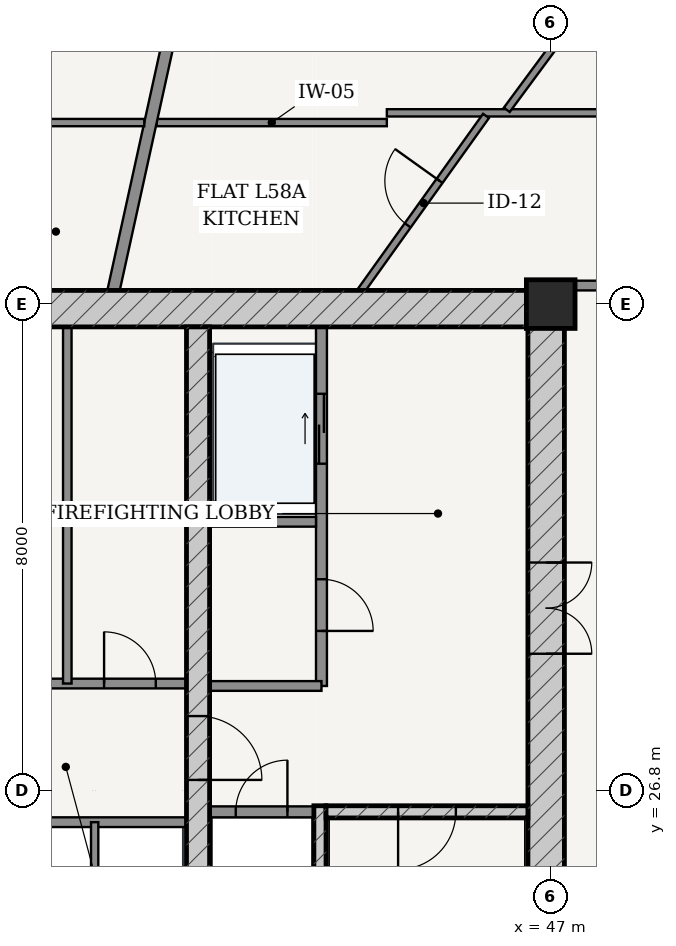
"""IFC4 building model, lengths in metres.
Left out: names, types, materials, properties, quantities, classifications, styles, units other than length and angle.
Written with IfcOpenShell. Run it as: python <this file> out.ifc"""

import sys

from ifc_helpers import new_model, si_unit, direction, frame, frame_2d, origin, origin_2d, place, context, subcontext, project, spatial, rectangle, extrude, source, transform, mapped, element, fill, save


model = new_model("IFC4")
c1 = context("Model", 3, precision=1e-05, world=origin(), true_north=direction((-0.2419218956, 0.970295726276)))
c2 = subcontext(c1, "Body", "Model", "MODEL_VIEW")
j1 = project(units=[si_unit("LENGTHUNIT", "METRE"), si_unit("PLANEANGLEUNIT", "RADIAN")], contexts=[c1])
p1 = place(None, origin())
s1 = spatial("IfcSite", under=j1, at=p1, CompositionType="ELEMENT")
p2 = place(p1, origin())
s2 = spatial("IfcBuilding", under=s1, at=p2, CompositionType="ELEMENT")
p3 = place(p2, frame((0.0, 0.0, 220.8)))
s3 = spatial("IfcBuildingStorey", under=s2, at=p3, CompositionType="ELEMENT", Elevation=220.8)
p4 = place(p3, frame((47.0, 34.8, 0.0), z_axis=(0.0, 0.0, 1.0), x_axis=(1.0, 0.0, 0.0)))
e1 = element("IfcColumn", 1, at=p4, inside=s3, PredefinedType="COLUMN", context=c2, shape_type="SweptSolid", body=[
    extrude(rectangle(XDim=0.8, YDim=0.8, at=origin_2d()), origin(), (0.0, 0.0, 1.0), 3.7),
])
p5 = place(p3, frame((28.775, 34.725, 0.0), z_axis=(0.0, 0.0, 1.0), x_axis=(1.0, 0.0, 0.0)))
e2 = element("IfcWall", 2, at=p5, inside=s3, PredefinedType="SHEAR", context=c2, shape_type="SweptSolid", body=[
    extrude(rectangle(XDim=18.45, YDim=0.6, at=frame_2d((9.225, 0.0))), origin(), (0.0, 0.0, 1.0), 3.435),
])
p6 = place(p3, frame((46.925, 19.175, 0.0), z_axis=(0.0, 0.0, 1.0), x_axis=(0.0, 1.0, 0.0)))
e3 = element("IfcWall", 3, at=p6, inside=s3, PredefinedType="SHEAR", context=c2, shape_type="SweptSolid", body=[
    extrude(rectangle(XDim=15.25, YDim=0.6, at=frame_2d((7.625, 0.0))), origin(), (0.0, 0.0, 1.0), 3.435),
])
p7 = place(p6, frame((9.875, 0.0, 0.0)))
e4 = element("IfcOpeningElement", 4, at=p7, cuts=e3, PredefinedType="OPENING", context=c2, shape_type="SweptSolid", body=[
    extrude(rectangle(XDim=1.5, YDim=2.2, at=frame_2d((0.75, 1.1))), frame((0.0, 0.31, 0.0), z_axis=(0.0, -1.0, 0.0), x_axis=(1.0, 0.0, 0.0)), (0.0, 0.0, 1.0), 0.62),
])
p8 = place(p3, frame((43.205, 19.175, 0.0), z_axis=(0.0, 0.0, 1.0), x_axis=(0.0, 1.0, 0.0)))
e5 = element("IfcWall", 5, at=p8, inside=s3, PredefinedType="SOLIDWALL", context=c2, shape_type="SweptSolid", body=[
    extrude(rectangle(XDim=7.375, YDim=0.2, at=frame_2d((3.688, 0.0))), origin(), (0.0, 0.0, 1.0), 3.435),
])
p9 = place(p3, frame((43.305, 26.45, 0.0), z_axis=(0.0, 0.0, 1.0), x_axis=(1.0, 0.0, 0.0)))
e6 = element("IfcWall", 6, at=p9, inside=s3, PredefinedType="SOLIDWALL", context=c2, shape_type="SweptSolid", body=[
    extrude(rectangle(XDim=3.32, YDim=0.2, at=frame_2d((1.66, 0.0))), origin(), (0.0, 0.0, 1.0), 3.435),
])
p10 = place(p9, frame((1.185, 0.0, 0.0)))
e7 = element("IfcOpeningElement", 7, at=p10, cuts=e6, PredefinedType="OPENING", context=c2, shape_type="SweptSolid", body=[
    extrude(rectangle(XDim=0.95, YDim=2.15, at=frame_2d((0.475, 1.075))), frame((0.0, 0.11, 0.0), z_axis=(0.0, -1.0, 0.0), x_axis=(1.0, 0.0, 0.0)), (0.0, 0.0, 1.0), 0.22),
])
p11 = place(p3, frame((41.2, 19.175, 0.0), z_axis=(0.0, 0.0, 1.0), x_axis=(0.0, 1.0, 0.0)))
e8 = element("IfcWall", 8, at=p11, inside=s3, PredefinedType="SHEAR", context=c2, shape_type="SweptSolid", body=[
    extrude(rectangle(XDim=15.25, YDim=0.38, at=frame_2d((7.625, 0.0))), origin(), (0.0, 0.0, 1.0), 3.435),
])
p12 = place(p11, frame((7.8, 0.0, 0.0)))
e9 = element("IfcOpeningElement", 9, at=p12, cuts=e8, PredefinedType="OPENING", context=c2, shape_type="SweptSolid", body=[
    extrude(rectangle(XDim=1.05, YDim=2.15, at=frame_2d((0.525, 1.075))), frame((0.0, 0.2, 0.0), z_axis=(0.0, -1.0, 0.0), x_axis=(1.0, 0.0, 0.0)), (0.0, 0.0, 1.0), 0.4),
])
p13 = place(p3, frame((41.39, 26.45, 0.0), z_axis=(0.0, 0.0, 1.0), x_axis=(1.0, 0.0, 0.0)))
e10 = element("IfcWall", 10, at=p13, inside=s3, PredefinedType="PARTITIONING", context=c2, shape_type="SweptSolid", body=[
    extrude(rectangle(XDim=1.71, YDim=0.18, at=frame_2d((0.855, 0.0))), origin(), (0.0, 0.0, 1.0), 3.435),
])
p14 = place(p13, frame((0.43, 0.0, 0.0)))
e11 = element("IfcOpeningElement", 11, at=p14, cuts=e10, PredefinedType="OPENING", context=c2, shape_type="SweptSolid", body=[
    extrude(rectangle(XDim=0.85, YDim=2.1, at=frame_2d((0.425, 1.05))), frame((0.0, 0.1, 0.0), z_axis=(0.0, -1.0, 0.0), x_axis=(1.0, 0.0, 0.0)), (0.0, 0.0, 1.0), 0.2),
])
p15 = place(p3, frame((43.23, 28.52, 0.0), z_axis=(0.0, 0.0, 1.0), x_axis=(0.0, 1.0, 0.0)))
e12 = element("IfcWall", 12, at=p15, inside=s3, PredefinedType="PARTITIONING", context=c2, shape_type="SweptSolid", body=[
    extrude(rectangle(XDim=5.905, YDim=0.18, at=frame_2d((2.953, 0.0))), origin(), (0.0, 0.0, 1.0), 3.435),
])
p16 = place(p15, frame((0.905, 0.0, 0.0)))
e13 = element("IfcOpeningElement", 13, at=p16, cuts=e12, PredefinedType="OPENING", context=c2, shape_type="SweptSolid", body=[
    extrude(rectangle(XDim=0.85, YDim=2.1, at=frame_2d((0.425, 1.05))), frame((0.0, 0.1, 0.0), z_axis=(0.0, -1.0, 0.0), x_axis=(1.0, 0.0, 0.0)), (0.0, 0.0, 1.0), 0.2),
])
p17 = place(p15, frame((3.655, 0.0, 0.0)))
e14 = element("IfcOpeningElement", 14, at=p17, cuts=e12, PredefinedType="OPENING", context=c2, shape_type="SweptSolid", body=[
    extrude(rectangle(XDim=1.15, YDim=2.2, at=frame_2d((0.575, 1.1))), frame((0.0, 0.1, 0.0), z_axis=(0.0, -1.0, 0.0), x_axis=(1.0, 0.0, 0.0)), (0.0, 0.0, 1.0), 0.2),
])
p18 = place(p3, frame((41.39, 31.22, 0.0), z_axis=(0.0, 0.0, 1.0), x_axis=(1.0, 0.0, 0.0)))
e15 = element("IfcWall", 15, at=p18, inside=s3, PredefinedType="PARTITIONING", context=c2, shape_type="SweptSolid", body=[
    extrude(rectangle(XDim=1.75, YDim=0.16, at=frame_2d((0.875, 0.0))), origin(), (0.0, 0.0, 1.0), 3.435),
])
p19 = place(p3, frame((41.39, 28.52, 0.0), z_axis=(0.0, 0.0, 1.0), x_axis=(1.0, 0.0, 0.0)))
e16 = element("IfcWall", 16, at=p19, inside=s3, PredefinedType="PARTITIONING", context=c2, shape_type="SweptSolid", body=[
    extrude(rectangle(XDim=1.84, YDim=0.16, at=frame_2d((0.92, 0.0))), origin(), (0.0, 0.0, 1.0), 3.435),
])
p20 = place(p3, frame((34.99, 28.56, 0.0), z_axis=(0.0, 0.0, 1.0), x_axis=(1.0, 0.0, 0.0)))
e17 = element("IfcWall", 17, at=p20, inside=s3, PredefinedType="PARTITIONING", context=c2, shape_type="SweptSolid", body=[
    extrude(rectangle(XDim=6.02, YDim=0.16, at=frame_2d((3.01, 0.0))), origin(), (0.0, 0.0, 1.0), 3.435),
])
p21 = place(p20, frame((0.505, 0.0, 0.0)))
e18 = element("IfcOpeningElement", 18, at=p21, cuts=e17, PredefinedType="OPENING", context=c2, shape_type="SweptSolid", body=[
    extrude(rectangle(XDim=0.85, YDim=2.1, at=frame_2d((0.425, 1.05))), frame((0.0, 0.09, 0.0), z_axis=(0.0, -1.0, 0.0), x_axis=(1.0, 0.0, 0.0)), (0.0, 0.0, 1.0), 0.18),
])
p22 = place(p20, frame((2.58, 0.0, 0.0)))
e19 = element("IfcOpeningElement", 19, at=p22, cuts=e17, PredefinedType="OPENING", context=c2, shape_type="SweptSolid", body=[
    extrude(rectangle(XDim=0.86, YDim=2.1, at=frame_2d((0.43, 1.05))), frame((0.0, 0.09, 0.0), z_axis=(0.0, -1.0, 0.0), x_axis=(1.0, 0.0, 0.0)), (0.0, 0.0, 1.0), 0.18),
])
p23 = place(p20, frame((4.665, 0.0, 0.0)))
e20 = element("IfcOpeningElement", 20, at=p23, cuts=e17, PredefinedType="OPENING", context=c2, shape_type="SweptSolid", body=[
    extrude(rectangle(XDim=0.85, YDim=2.1, at=frame_2d((0.425, 1.05))), frame((0.0, 0.09, 0.0), z_axis=(0.0, -1.0, 0.0), x_axis=(1.0, 0.0, 0.0)), (0.0, 0.0, 1.0), 0.18),
])
p24 = place(p3, frame((39.05, 28.56, 0.0), z_axis=(0.0, 0.0, 1.0), x_axis=(0.0, 1.0, 0.0)))
e21 = element("IfcWall", 21, at=p24, inside=s3, PredefinedType="PARTITIONING", context=c2, shape_type="SweptSolid", body=[
    extrude(rectangle(XDim=5.865, YDim=0.14, at=frame_2d((2.933, 0.0))), origin(), (0.0, 0.0, 1.0), 3.435),
])
p25 = place(p3, frame((34.99, 26.28, 0.0), z_axis=(0.0, 0.0, 1.0), x_axis=(1.0, 0.0, 0.0)))
e22 = element("IfcWall", 22, at=p25, inside=s3, PredefinedType="PARTITIONING", context=c2, shape_type="SweptSolid", body=[
    extrude(rectangle(XDim=6.02, YDim=0.16, at=frame_2d((3.01, 0.0))), origin(), (0.0, 0.0, 1.0), 3.435),
])
p26 = place(p25, frame((0.225, 0.0, 0.0)))
e23 = element("IfcOpeningElement", 23, at=p26, cuts=e22, PredefinedType="OPENING", context=c2, shape_type="SweptSolid", body=[
    extrude(rectangle(XDim=1.1, YDim=2.2, at=frame_2d((0.55, 1.1))), frame((0.0, 0.09, 0.0), z_axis=(0.0, -1.0, 0.0), x_axis=(1.0, 0.0, 0.0)), (0.0, 0.0, 1.0), 0.18),
])
p27 = place(p25, frame((1.705, 0.0, 0.0)))
e24 = element("IfcOpeningElement", 24, at=p27, cuts=e22, PredefinedType="OPENING", context=c2, shape_type="SweptSolid", body=[
    extrude(rectangle(XDim=1.1, YDim=2.2, at=frame_2d((0.55, 1.1))), frame((0.0, 0.09, 0.0), z_axis=(0.0, -1.0, 0.0), x_axis=(1.0, 0.0, 0.0)), (0.0, 0.0, 1.0), 0.18),
])
p28 = place(p3, frame((39.5, 23.72, 0.0), z_axis=(0.0, 0.0, 1.0), x_axis=(0.0, 1.0, 0.0)))
e25 = element("IfcWall", 25, at=p28, inside=s3, PredefinedType="PARTITIONING", context=c2, shape_type="SweptSolid", body=[
    extrude(rectangle(XDim=2.56, YDim=0.12, at=frame_2d((1.28, 0.0))), origin(), (0.0, 0.0, 1.0), 3.435),
])
p29 = place(p3, frame((47.225, 35.105, 0.0), z_axis=(0.0, 0.0, 1.0), x_axis=(1.0, 0.0, 0.0)))
e26 = element("IfcWall", 26, at=p29, inside=s3, PredefinedType="PARTITIONING", context=c2, shape_type="SweptSolid", body=[
    extrude(rectangle(XDim=1.93, YDim=0.16, at=frame_2d((0.965, 0.0))), origin(), (0.0, 0.0, 1.0), 3.435),
])
p30 = place(p3, frame((40.52, 37.785, 0.0), z_axis=(0.0, 0.0, 1.0), x_axis=(1.0, 0.0, 0.0)))
e27 = element("IfcWall", 27, at=p30, inside=s3, PredefinedType="PARTITIONING", context=c2, shape_type="SweptSolid", body=[
    extrude(rectangle(XDim=3.785, YDim=0.12, at=frame_2d((1.893, 0.0))), origin(), (0.0, 0.0, 1.0), 2.951),
])
p31 = place(p3, frame((44.305, 37.945, 0.0), z_axis=(0.0, 0.0, 1.0), x_axis=(1.0, 0.0, 0.0)))
e28 = element("IfcWall", 28, at=p31, inside=s3, PredefinedType="PARTITIONING", context=c2, shape_type="SweptSolid", body=[
    extrude(rectangle(XDim=7.69, YDim=0.12, at=frame_2d((3.845, 0.0))), origin(), (0.0, 0.0, 1.0), 2.951),
])
p32 = place(p31, frame((3.591, 0.0, 0.0)))
e29 = element("IfcOpeningElement", 29, at=p32, cuts=e28, PredefinedType="OPENING", context=c2, shape_type="SweptSolid", body=[
    extrude(rectangle(XDim=0.9, YDim=2.15, at=frame_2d((0.45, 1.075))), frame((0.0, 0.07, 0.0), z_axis=(0.0, -1.0, 0.0), x_axis=(1.0, 0.0, 0.0)), (0.0, 0.0, 1.0), 0.14),
])
p33 = place(p3, frame((46.278, 37.995, 0.0), z_axis=(0.0, 0.0, 1.0), x_axis=(0.594518724985, 0.80408176552, 0.0)))
e30 = element("IfcWall", 30, at=p33, inside=s3, PredefinedType="PARTITIONING", context=c2, shape_type="SweptSolid", body=[
    extrude(rectangle(XDim=6.344, YDim=0.12, at=frame_2d((3.172, 0.0))), origin(), (0.0, 0.0, 1.0), 2.951),
])
p34 = place(p33, frame((1.715, 0.0, 0.0)))
e31 = element("IfcOpeningElement", 31, at=p34, cuts=e30, PredefinedType="OPENING", context=c2, shape_type="SweptSolid", body=[
    extrude(rectangle(XDim=0.9, YDim=2.15, at=frame_2d((0.45, 1.075))), frame((0.0, 0.07, 0.0), z_axis=(0.0, -1.0, 0.0), x_axis=(1.0, 0.0, 0.0)), (0.0, 0.0, 1.0), 0.14),
])
p35 = place(p3, frame((43.885, 35.027, 0.0), z_axis=(0.0, 0.0, 1.0), x_axis=(0.581801309538, 0.813330951225, 0.0)))
e32 = element("IfcWall", 32, at=p35, inside=s3, PredefinedType="PARTITIONING", context=c2, shape_type="SweptSolid", body=[
    extrude(rectangle(XDim=3.526, YDim=0.12, at=frame_2d((1.763, 0.0))), origin(), (0.0, 0.0, 1.0), 3.435),
])
p36 = place(p35, frame((1.313, 0.0, 0.0)))
e33 = element("IfcOpeningElement", 33, at=p36, cuts=e32, PredefinedType="OPENING", context=c2, shape_type="SweptSolid", body=[
    extrude(rectangle(XDim=0.9, YDim=2.15, at=frame_2d((0.45, 1.075))), frame((0.0, 0.07, 0.0), z_axis=(0.0, -1.0, 0.0), x_axis=(1.0, 0.0, 0.0)), (0.0, 0.0, 1.0), 0.14),
])
p37 = place(p3, frame((39.811, 35.027, 0.0), z_axis=(0.0, 0.0, 1.0), x_axis=(0.214966857327, 0.976621344356, 0.0)))
e34 = element("IfcWall", 34, at=p37, inside=s3, PredefinedType="PARTITIONING", context=c2, shape_type="SweptSolid", body=[
    extrude(rectangle(XDim=11.258, YDim=0.2, at=frame_2d((5.629, 0.0))), origin(), (0.0, 0.0, 1.0), 2.52),
])
p38 = place(p3, frame((31.695, 37.785, 0.0), z_axis=(0.0, 0.0, 1.0), x_axis=(1.0, 0.0, 0.0)))
e35 = element("IfcWall", 35, at=p38, inside=s3, PredefinedType="PARTITIONING", context=c2, shape_type="SweptSolid", body=[
    extrude(rectangle(XDim=8.621, YDim=0.12, at=frame_2d((4.311, 0.0))), origin(), (0.0, 0.0, 1.0), 2.951),
])
p39 = place(p38, frame((1.716, 0.0, 0.0)))
e36 = element("IfcOpeningElement", 36, at=p39, cuts=e35, PredefinedType="OPENING", context=c2, shape_type="SweptSolid", body=[
    extrude(rectangle(XDim=0.9, YDim=2.15, at=frame_2d((0.45, 1.075))), frame((0.0, 0.07, 0.0), z_axis=(0.0, -1.0, 0.0), x_axis=(1.0, 0.0, 0.0)), (0.0, 0.0, 1.0), 0.14),
])
p40 = place(p38, frame((5.784, 0.0, 0.0)))
e37 = element("IfcOpeningElement", 37, at=p40, cuts=e35, PredefinedType="OPENING", context=c2, shape_type="SweptSolid", body=[
    extrude(rectangle(XDim=0.9, YDim=2.15, at=frame_2d((0.45, 1.075))), frame((0.0, 0.07, 0.0), z_axis=(0.0, -1.0, 0.0), x_axis=(1.0, 0.0, 0.0)), (0.0, 0.0, 1.0), 0.14),
])
m1 = source(origin(), c2, "Body", "SweptSolid", [
    extrude(rectangle(XDim=1.5, YDim=2.2, at=frame_2d((0.75, 1.1))), frame((0.0, 0.025, 0.0), z_axis=(0.0, -1.0, 0.0), x_axis=(1.0, 0.0, 0.0)), (0.0, 0.0, 1.0), 0.05),
])
p41 = place(p7, frame((1.5, 0.0, 0.0), z_axis=(0.0, 0.0, 1.0), x_axis=(-1.0, 0.0, 0.0)))
e38 = element("IfcDoor", 38, at=p41, inside=s3, OperationType="DOUBLE_DOOR_SINGLE_SWING", PredefinedType="DOOR", context=c2, shape_type="MappedRepresentation", body=[
    mapped(m1, transform((0.0, 0.0, 0.0), scale=1.0)),
])
fill(e4, e38)
m2 = source(origin(), c2, "Body", "SweptSolid", [
    extrude(rectangle(XDim=1.05, YDim=2.15, at=frame_2d((0.525, 1.075))), frame((0.0, 0.025, 0.0), z_axis=(0.0, -1.0, 0.0), x_axis=(1.0, 0.0, 0.0)), (0.0, 0.0, 1.0), 0.05),
])
p42 = place(p12, frame((1.05, 0.0, 0.0), z_axis=(0.0, 0.0, 1.0), x_axis=(-1.0, 0.0, 0.0)))
e39 = element("IfcDoor", 39, at=p42, inside=s3, OperationType="SINGLE_SWING_RIGHT", PredefinedType="DOOR", context=c2, shape_type="MappedRepresentation", body=[
    mapped(m2, transform((0.0, 0.0, 0.0), scale=1.0)),
])
fill(e9, e39)
m3 = source(origin(), c2, "Body", "SweptSolid", [
    extrude(rectangle(XDim=0.95, YDim=2.15, at=frame_2d((0.475, 1.075))), frame((0.0, 0.025, 0.0), z_axis=(0.0, -1.0, 0.0), x_axis=(1.0, 0.0, 0.0)), (0.0, 0.0, 1.0), 0.05),
])
p43 = place(p10, frame((0.95, 0.0, 0.0), z_axis=(0.0, 0.0, 1.0), x_axis=(-1.0, 0.0, 0.0)))
e40 = element("IfcDoor", 40, at=p43, inside=s3, OperationType="SINGLE_SWING_RIGHT", PredefinedType="DOOR", context=c2, shape_type="MappedRepresentation", body=[
    mapped(m3, transform((0.0, 0.0, 0.0), scale=1.0)),
])
fill(e7, e40)
m4 = source(origin(), c2, "Body", "SweptSolid", [
    extrude(rectangle(XDim=0.85, YDim=2.1, at=frame_2d((0.425, 1.05))), frame((0.0, 0.025, 0.0), z_axis=(0.0, -1.0, 0.0), x_axis=(1.0, 0.0, 0.0)), (0.0, 0.0, 1.0), 0.05),
])
p44 = place(p14, origin())
e41 = element("IfcDoor", 41, at=p44, inside=s3, OperationType="SINGLE_SWING_RIGHT", PredefinedType="DOOR", context=c2, shape_type="MappedRepresentation", body=[
    mapped(m4, transform((0.0, 0.0, 0.0), scale=1.0)),
])
fill(e11, e41)
p45 = place(p16, frame((0.85, 0.0, 0.0), z_axis=(0.0, 0.0, 1.0), x_axis=(-1.0, 0.0, 0.0)))
e42 = element("IfcDoor", 42, at=p45, inside=s3, OperationType="SINGLE_SWING_RIGHT", PredefinedType="DOOR", context=c2, shape_type="MappedRepresentation", body=[
    mapped(m4, transform((0.0, 0.0, 0.0), scale=1.0)),
])
fill(e13, e42)
p46 = place(p23, origin())
e43 = element("IfcDoor", 43, at=p46, inside=s3, OperationType="SINGLE_SWING_LEFT", PredefinedType="DOOR", context=c2, shape_type="MappedRepresentation", body=[
    mapped(m4, transform((0.0, 0.0, 0.0), scale=1.0)),
])
fill(e20, e43)
m5 = source(origin(), c2, "Body", "SweptSolid", [
    extrude(rectangle(XDim=1.15, YDim=2.2, at=frame_2d((0.575, 1.1))), frame((0.0, 0.025, 0.0), z_axis=(0.0, -1.0, 0.0), x_axis=(1.0, 0.0, 0.0)), (0.0, 0.0, 1.0), 0.05),
])
p47 = place(p17, origin())
e44 = element("IfcDoor", 44, at=p47, inside=s3, OperationType="DOUBLE_DOOR_SLIDING", PredefinedType="DOOR", context=c2, shape_type="MappedRepresentation", body=[
    mapped(m5, transform((0.0, 0.0, 0.0), scale=1.0)),
])
fill(e14, e44)
m6 = source(origin(), c2, "Body", "SweptSolid", [
    extrude(rectangle(XDim=0.9, YDim=2.15, at=frame_2d((0.45, 1.075))), frame((0.0, 0.025, 0.0), z_axis=(0.0, -1.0, 0.0), x_axis=(1.0, 0.0, 0.0)), (0.0, 0.0, 1.0), 0.05),
])
p48 = place(p36, origin())
e45 = element("IfcDoor", 45, at=p48, inside=s3, OperationType="SINGLE_SWING_RIGHT", PredefinedType="DOOR", context=c2, shape_type="MappedRepresentation", body=[
    mapped(m6, transform((0.0, 0.0, 0.0), scale=1.0)),
])
fill(e33, e45)
save(model, sys.argv[1])
